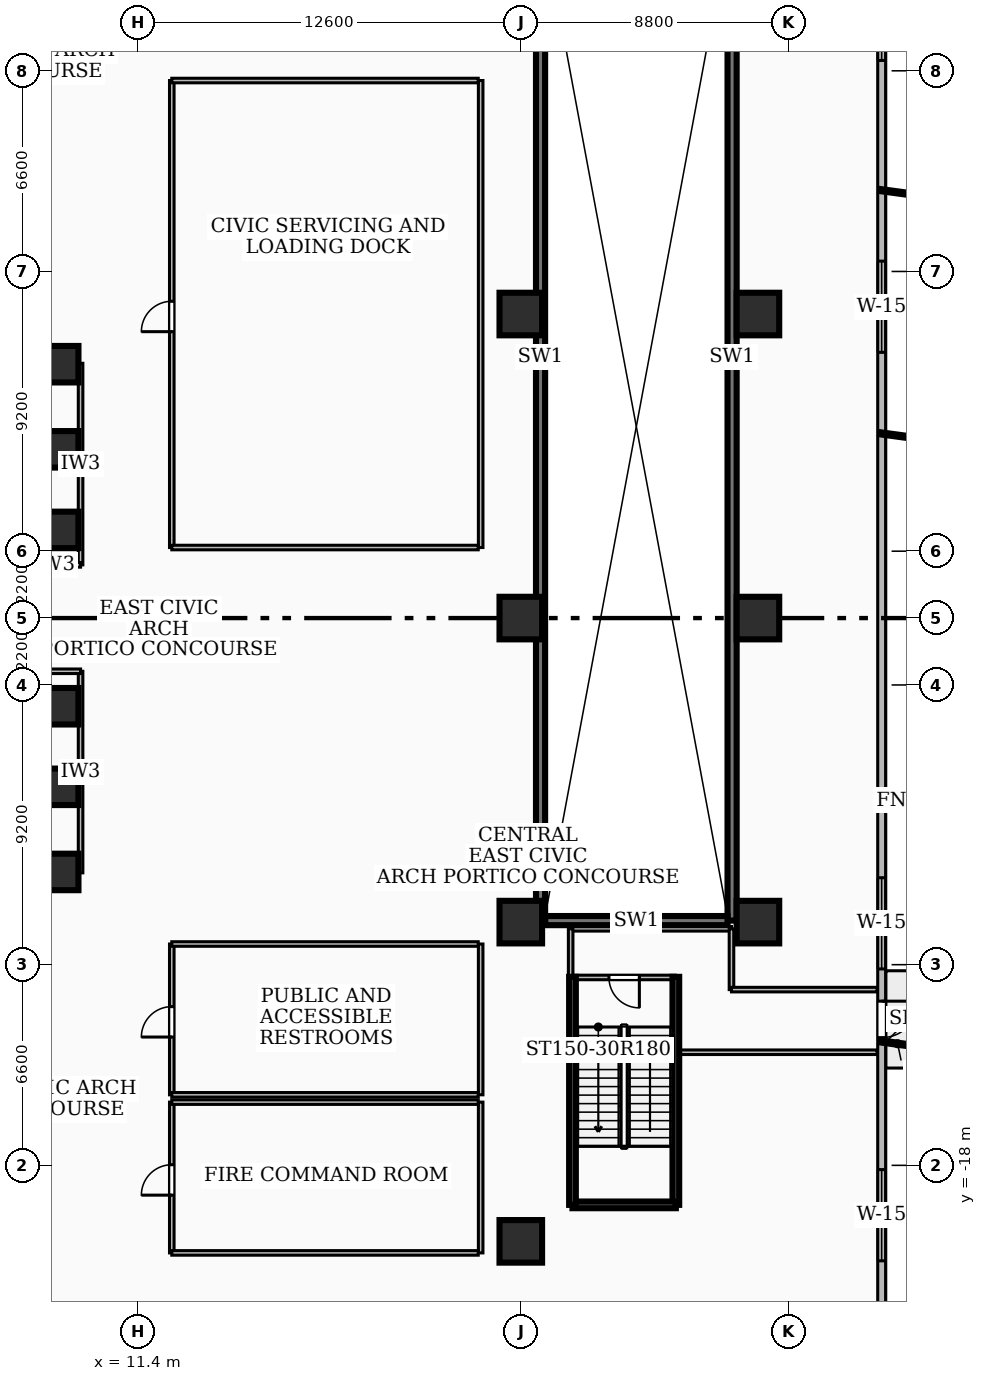
"""IFC4 building model, lengths in metres.
Left out: names, types, materials, properties, quantities, classifications, styles, units other than length and angle.
Written with IfcOpenShell. Run it as: python <this file> out.ifc"""

import sys

from ifc_helpers import new_model, si_unit, direction, frame, frame_2d, origin, origin_2d, place, context, subcontext, project, spatial, rectangle, extrude, element, fill, save


model = new_model("IFC4")
c1 = context("Model", 3, precision=1e-05, world=origin(), true_north=direction((0.0, 1.0)))
c2 = subcontext(c1, "Body", "Model", "MODEL_VIEW")
j1 = project(units=[si_unit("LENGTHUNIT", "METRE"), si_unit("PLANEANGLEUNIT", "RADIAN")], contexts=[c1])
p1 = place(None, origin())
s1 = spatial("IfcSite", under=j1, at=p1, CompositionType="ELEMENT")
p2 = place(p1, origin())
s2 = spatial("IfcBuilding", under=s1, at=p2, CompositionType="ELEMENT")
p3 = place(p2, origin())
s3 = spatial("IfcBuildingStorey", under=s2, at=p3, CompositionType="ELEMENT", Elevation=0.0)
p4 = place(p3, frame((-8.78, 8.585, 0.0), z_axis=(0.0, 0.0, 1.0), x_axis=(1.0, 0.0, 0.0)))
e1 = element("IfcWall", 1, at=p4, inside=s3, PredefinedType="SHEAR", context=c2, shape_type="SweptSolid", body=[
    extrude(rectangle(XDim=17.56, YDim=0.55, at=frame_2d((8.78, 0.0))), origin(), (0.0, 0.0, 1.0), 5.08),
])
p5 = place(p4, frame((7.29, 0.0, 0.0)))
e2 = element("IfcOpeningElement", 2, at=p5, cuts=e1, PredefinedType="OPENING", context=c2, shape_type="SweptSolid", body=[
    extrude(rectangle(XDim=1.1, YDim=2.15, at=frame_2d((0.55, 1.075))), frame((0.0, 0.285, 0.0), z_axis=(0.0, -1.0, 0.0), x_axis=(1.0, 0.0, 0.0)), (0.0, 0.0, 1.0), 0.57),
])
p6 = place(p3, frame((8.78, -8.585, 0.0), z_axis=(0.0, 0.0, 1.0), x_axis=(-1.0, 0.0, 0.0)))
e3 = element("IfcWall", 3, at=p6, inside=s3, PredefinedType="SHEAR", context=c2, shape_type="SweptSolid", body=[
    extrude(rectangle(XDim=17.56, YDim=0.55, at=frame_2d((8.78, 0.0))), origin(), (0.0, 0.0, 1.0), 5.08),
])
p7 = place(p6, frame((7.29, 0.0, 0.0)))
e4 = element("IfcOpeningElement", 4, at=p7, cuts=e3, PredefinedType="OPENING", context=c2, shape_type="SweptSolid", body=[
    extrude(rectangle(XDim=1.1, YDim=2.15, at=frame_2d((0.55, 1.075))), frame((0.0, 0.285, 0.0), z_axis=(0.0, -1.0, 0.0), x_axis=(1.0, 0.0, 0.0)), (0.0, 0.0, 1.0), 0.57),
])
for number, where, z_axis, x_axis in (
    (5, (25.7, -19.3, 0.0), (0.0, 0.0, 1.0), (0.0, 1.0, 0.0)),
    (6, (29.1, -19.3, 0.0), (0.0, 0.0, 1.0), (0.0, 1.0, 0.0)),
):
    element("IfcWall", number, at=place(p3, frame(where, z_axis=z_axis, x_axis=x_axis)), inside=s3, PredefinedType="SOLIDWALL", context=c2, shape_type="SweptSolid", body=[
        extrude(rectangle(XDim=7.5, YDim=0.22, at=frame_2d((3.75, 0.0))), origin(), (0.0, 0.0, 1.0), 5.08),
    ])
p8 = place(p3, frame((25.7, -19.3, 0.0), z_axis=(0.0, 0.0, 1.0), x_axis=(1.0, 0.0, 0.0)))
e7 = element("IfcWall", 7, at=p8, inside=s3, PredefinedType="SOLIDWALL", context=c2, shape_type="SweptSolid", body=[
    extrude(rectangle(XDim=3.4, YDim=0.22, at=frame_2d((1.7, 0.0))), origin(), (0.0, 0.0, 1.0), 5.08),
])
for number, where, z_axis, x_axis in (
    (8, (24.65, -9.95, 0.0), (0.0, 0.0, 1.0), (0.0, 1.0, 0.0)),
    (9, (30.95, 27.1, 0.0), (0.0, 0.0, 1.0), (0.0, -1.0, 0.0)),
):
    element("IfcWall", number, at=place(p3, frame(where, z_axis=z_axis, x_axis=x_axis)), inside=s3, PredefinedType="SOLIDWALL", context=c2, shape_type="SweptSolid", body=[
        extrude(rectangle(XDim=37.05, YDim=0.3, at=frame_2d((18.525, 0.0))), origin(), (0.0, 0.0, 1.0), 5.08),
    ])
p9 = place(p3, frame((30.8, -9.95, 0.0), z_axis=(0.0, 0.0, 1.0), x_axis=(-1.0, 0.0, 0.0)))
e10 = element("IfcWall", 10, at=p9, inside=s3, PredefinedType="SOLIDWALL", context=c2, shape_type="SweptSolid", body=[
    extrude(rectangle(XDim=6.0, YDim=0.3, at=frame_2d((3.0, 0.0))), origin(), (0.0, 0.0, 1.0), 5.08),
])
for number, where, z_axis, x_axis in (
    (11, (8.85, -5.55, 0.0), (0.0, 0.0, 1.0), (1.0, 0.0, 0.0)),
    (12, (8.85, -2.9, 0.0), (0.0, 0.0, 1.0), (1.0, 0.0, 0.0)),
    (13, (8.85, 2.9, 0.0), (0.0, 0.0, 1.0), (1.0, 0.0, 0.0)),
    (14, (8.85, 5.55, 0.0), (0.0, 0.0, 1.0), (1.0, 0.0, 0.0)),
    (15, (8.85, -8.35, 0.0), (0.0, 0.0, 1.0), (1.0, 0.0, 0.0)),
    (16, (8.85, 8.35, 0.0), (0.0, 0.0, 1.0), (1.0, 0.0, 0.0)),
):
    element("IfcColumn", number, at=place(p3, frame(where, z_axis=z_axis, x_axis=x_axis)), inside=s3, PredefinedType="COLUMN", context=c2, shape_type="SweptSolid", body=[
        extrude(rectangle(XDim=1.2, YDim=1.2, at=origin_2d()), origin(), (0.0, 0.0, 1.0), 5.4),
    ])
for number, where, z_axis, x_axis in (
    (17, (31.8, -10.0, 0.0), (0.0, 0.0, 1.0), (1.0, 0.0, 0.0)),
    (18, (31.8, 0.0, 0.0), (0.0, 0.0, 1.0), (1.0, 0.0, 0.0)),
    (19, (31.8, 10.0, 0.0), (0.0, 0.0, 1.0), (1.0, 0.0, 0.0)),
    (20, (24.0, -10.0, 0.0), (0.0, 0.0, 1.0), (1.0, 0.0, 0.0)),
    (21, (24.0, 0.0, 0.0), (0.0, 0.0, 1.0), (1.0, 0.0, 0.0)),
    (22, (24.0, 10.0, 0.0), (0.0, 0.0, 1.0), (1.0, 0.0, 0.0)),
    (23, (24.0, -20.5, 0.0), (0.0, 0.0, 1.0), (1.0, 0.0, 0.0)),
):
    element("IfcColumn", number, at=place(p3, frame(where, z_axis=z_axis, x_axis=x_axis)), inside=s3, PredefinedType="COLUMN", context=c2, shape_type="SweptSolid", body=[
        extrude(rectangle(XDim=1.4, YDim=1.4, at=origin_2d()), origin(), (0.0, 0.0, 1.0), 5.4),
    ])
p10 = place(p3, frame((35.87, 27.34, 0.0), z_axis=(0.0, 0.0, 1.0), x_axis=(0.0, -1.0, 0.0)))
e24 = element("IfcWall", 24, at=p10, inside=s3, PredefinedType="SOLIDWALL", context=c2, shape_type="SweptSolid", body=[
    extrude(rectangle(XDim=54.68, YDim=0.26, at=frame_2d((27.34, 0.0))), origin(), (0.0, 0.0, 1.0), 5.08),
])
p11 = place(p10, frame((39.94, 0.0, 0.0)))
e25 = element("IfcOpeningElement", 25, at=p11, cuts=e24, PredefinedType="OPENING", context=c2, shape_type="SweptSolid", body=[
    extrude(rectangle(XDim=1.2, YDim=2.15, at=frame_2d((0.6, 1.075))), frame((0.0, 0.14, 0.0), z_axis=(0.0, -1.0, 0.0), x_axis=(1.0, 0.0, 0.0)), (0.0, 0.0, 1.0), 0.28),
])
p12 = place(p10, frame((6.0, 0.0, 0.9)))
e26 = element("IfcOpeningElement", 26, at=p12, cuts=e24, PredefinedType="OPENING", context=c2, shape_type="SweptSolid", body=[
    extrude(rectangle(XDim=3.0, YDim=2.4, at=frame_2d((1.5, 1.2))), frame((0.0, 0.14, 0.0), z_axis=(0.0, -1.0, 0.0), x_axis=(1.0, 0.0, 0.0)), (0.0, 0.0, 1.0), 0.28),
])
p13 = place(p10, frame((15.6, 0.0, 0.9)))
e27 = element("IfcOpeningElement", 27, at=p13, cuts=e24, PredefinedType="OPENING", context=c2, shape_type="SweptSolid", body=[
    extrude(rectangle(XDim=3.0, YDim=2.4, at=frame_2d((1.5, 1.2))), frame((0.0, 0.14, 0.0), z_axis=(0.0, -1.0, 0.0), x_axis=(1.0, 0.0, 0.0)), (0.0, 0.0, 1.0), 0.28),
])
p14 = place(p10, frame((35.88, 0.0, 0.9)))
e28 = element("IfcOpeningElement", 28, at=p14, cuts=e24, PredefinedType="OPENING", context=c2, shape_type="SweptSolid", body=[
    extrude(rectangle(XDim=3.0, YDim=2.4, at=frame_2d((1.5, 1.2))), frame((0.0, 0.14, 0.0), z_axis=(0.0, -1.0, 0.0), x_axis=(1.0, 0.0, 0.0)), (0.0, 0.0, 1.0), 0.28),
])
p15 = place(p10, frame((45.48, 0.0, 0.9)))
e29 = element("IfcOpeningElement", 29, at=p15, cuts=e24, PredefinedType="OPENING", context=c2, shape_type="SweptSolid", body=[
    extrude(rectangle(XDim=3.0, YDim=2.4, at=frame_2d((1.5, 1.2))), frame((0.0, 0.14, 0.0), z_axis=(0.0, -1.0, 0.0), x_axis=(1.0, 0.0, 0.0)), (0.0, 0.0, 1.0), 0.28),
])
p16 = place(p3, frame((29.08, -11.82, 0.0), z_axis=(0.0, 0.0, 1.0), x_axis=(-1.0, 0.0, 0.0)))
e30 = element("IfcWall", 30, at=p16, inside=s3, PredefinedType="PARTITIONING", context=c2, shape_type="SweptSolid", body=[
    extrude(rectangle(XDim=3.36, YDim=0.15, at=frame_2d((1.68, 0.0))), origin(), (0.0, 0.0, 1.0), 5.08),
])
p17 = place(p16, frame((1.18, 0.0, 0.0)))
e31 = element("IfcOpeningElement", 31, at=p17, cuts=e30, PredefinedType="OPENING", context=c2, shape_type="SweptSolid", body=[
    extrude(rectangle(XDim=1.0, YDim=2.1, at=frame_2d((0.5, 1.05))), frame((0.0, 0.085, 0.0), z_axis=(0.0, -1.0, 0.0), x_axis=(1.0, 0.0, 0.0)), (0.0, 0.0, 1.0), 0.17),
])
p18 = place(p3, frame((9.52, 1.75, 0.0), z_axis=(0.0, 0.0, 1.0), x_axis=(0.0, 1.0, 0.0)))
e32 = element("IfcWall", 32, at=p18, inside=s3, PredefinedType="PARTITIONING", context=c2, shape_type="SweptSolid", body=[
    extrude(rectangle(XDim=6.63, YDim=0.15, at=frame_2d((3.315, 0.0))), origin(), (0.0, 0.0, 1.0), 4.09),
])
p19 = place(p3, frame((7.85, 1.75, 0.0), z_axis=(0.0, 0.0, 1.0), x_axis=(1.0, 0.0, 0.0)))
e33 = element("IfcWall", 33, at=p19, inside=s3, PredefinedType="PARTITIONING", context=c2, shape_type="SweptSolid", body=[
    extrude(rectangle(XDim=1.67, YDim=0.15, at=frame_2d((0.835, 0.0))), origin(), (0.0, 0.0, 1.0), 4.145),
])
p20 = place(p3, frame((9.52, -8.38, 0.0), z_axis=(0.0, 0.0, 1.0), x_axis=(0.0, 1.0, 0.0)))
e34 = element("IfcWall", 34, at=p20, inside=s3, PredefinedType="PARTITIONING", context=c2, shape_type="SweptSolid", body=[
    extrude(rectangle(XDim=6.63, YDim=0.15, at=frame_2d((3.315, 0.0))), origin(), (0.0, 0.0, 1.0), 4.09),
])
p21 = place(p3, frame((7.85, -1.75, 0.0), z_axis=(0.0, 0.0, 1.0), x_axis=(1.0, 0.0, 0.0)))
e35 = element("IfcWall", 35, at=p21, inside=s3, PredefinedType="PARTITIONING", context=c2, shape_type="SweptSolid", body=[
    extrude(rectangle(XDim=1.67, YDim=0.15, at=frame_2d((0.835, 0.0))), origin(), (0.0, 0.0, 1.0), 4.145),
])
p22 = place(p3, frame((25.64, -11.78, 0.0), z_axis=(0.0, 0.0, 1.0), x_axis=(0.0, 1.0, 0.0)))
e36 = element("IfcWall", 36, at=p22, inside=s3, PredefinedType="PARTITIONING", context=c2, shape_type="SweptSolid", body=[
    extrude(rectangle(XDim=1.56, YDim=0.15, at=frame_2d((0.78, 0.0))), origin(), (0.0, 0.0, 1.0), 5.08),
])
p23 = place(p3, frame((25.64, -10.22, 0.0), z_axis=(0.0, 0.0, 1.0), x_axis=(1.0, 0.0, 0.0)))
e37 = element("IfcWall", 37, at=p23, inside=s3, PredefinedType="PARTITIONING", context=c2, shape_type="SweptSolid", body=[
    extrude(rectangle(XDim=5.29, YDim=0.15, at=frame_2d((2.645, 0.0))), origin(), (0.0, 0.0, 1.0), 4.09),
])
p24 = place(p3, frame((30.93, -12.22, 0.0), z_axis=(0.0, 0.0, 1.0), x_axis=(0.0, 1.0, 0.0)))
e38 = element("IfcWall", 38, at=p24, inside=s3, PredefinedType="PARTITIONING", context=c2, shape_type="SweptSolid", body=[
    extrude(rectangle(XDim=2.0, YDim=0.15, at=frame_2d((1.0, 0.0))), origin(), (0.0, 0.0, 1.0), 5.08),
])
p25 = place(p3, frame((30.93, -12.22, 0.0), z_axis=(0.0, 0.0, 1.0), x_axis=(1.0, 0.0, 0.0)))
e39 = element("IfcWall", 39, at=p25, inside=s3, PredefinedType="PARTITIONING", context=c2, shape_type="SweptSolid", body=[
    extrude(rectangle(XDim=4.79, YDim=0.15, at=frame_2d((2.395, 0.0))), origin(), (0.0, 0.0, 1.0), 4.46),
])
p26 = place(p3, frame((29.2, -14.28, 0.0), z_axis=(0.0, 0.0, 1.0), x_axis=(1.0, 0.0, 0.0)))
e40 = element("IfcWall", 40, at=p26, inside=s3, PredefinedType="PARTITIONING", context=c2, shape_type="SweptSolid", body=[
    extrude(rectangle(XDim=6.52, YDim=0.15, at=frame_2d((3.26, 0.0))), origin(), (0.0, 0.0, 1.0), 4.46),
])
p27 = place(p3, frame((12.52, -20.88, 0.0), z_axis=(0.0, 0.0, 1.0), x_axis=(0.0, 1.0, 0.0)))
e41 = element("IfcWall", 41, at=p27, inside=s3, PredefinedType="PARTITIONING", context=c2, shape_type="SweptSolid", body=[
    extrude(rectangle(XDim=4.96, YDim=0.15, at=frame_2d((2.48, 0.0))), origin(), (0.0, 0.0, 1.0), 5.08),
])
p28 = place(p27, frame((1.9, 0.0, 0.0)))
e42 = element("IfcOpeningElement", 42, at=p28, cuts=e41, PredefinedType="OPENING", context=c2, shape_type="SweptSolid", body=[
    extrude(rectangle(XDim=1.0, YDim=2.1, at=frame_2d((0.5, 1.05))), frame((0.0, 0.085, 0.0), z_axis=(0.0, -1.0, 0.0), x_axis=(1.0, 0.0, 0.0)), (0.0, 0.0, 1.0), 0.17),
])
for number, where, z_axis, x_axis in (
    (43, (12.52, -20.88, 0.0), (0.0, 0.0, 1.0), (1.0, 0.0, 0.0)),
    (44, (12.52, -15.92, 0.0), (0.0, 0.0, 1.0), (1.0, 0.0, 0.0)),
):
    element("IfcWall", number, at=place(p3, frame(where, z_axis=z_axis, x_axis=x_axis)), inside=s3, PredefinedType="PARTITIONING", context=c2, shape_type="SweptSolid", body=[
        extrude(rectangle(XDim=10.08, YDim=0.15, at=frame_2d((5.04, 0.0))), origin(), (0.0, 0.0, 1.0), 5.08),
    ])
p29 = place(p3, frame((22.68, -20.88, 0.0), z_axis=(0.0, 0.0, 1.0), x_axis=(0.0, 1.0, 0.0)))
e45 = element("IfcWall", 45, at=p29, inside=s3, PredefinedType="PARTITIONING", context=c2, shape_type="SweptSolid", body=[
    extrude(rectangle(XDim=4.96, YDim=0.15, at=frame_2d((2.48, 0.0))), origin(), (0.0, 0.0, 1.0), 5.08),
])
p30 = place(p3, frame((12.52, -15.68, 0.0), z_axis=(0.0, 0.0, 1.0), x_axis=(0.0, 1.0, 0.0)))
e46 = element("IfcWall", 46, at=p30, inside=s3, PredefinedType="PARTITIONING", context=c2, shape_type="SweptSolid", body=[
    extrude(rectangle(XDim=4.96, YDim=0.15, at=frame_2d((2.48, 0.0))), origin(), (0.0, 0.0, 1.0), 5.08),
])
p31 = place(p30, frame((1.9, 0.0, 0.0)))
e47 = element("IfcOpeningElement", 47, at=p31, cuts=e46, PredefinedType="OPENING", context=c2, shape_type="SweptSolid", body=[
    extrude(rectangle(XDim=1.0, YDim=2.1, at=frame_2d((0.5, 1.05))), frame((0.0, 0.085, 0.0), z_axis=(0.0, -1.0, 0.0), x_axis=(1.0, 0.0, 0.0)), (0.0, 0.0, 1.0), 0.17),
])
for number, where, z_axis, x_axis in (
    (48, (12.52, -15.68, 0.0), (0.0, 0.0, 1.0), (1.0, 0.0, 0.0)),
    (49, (12.52, -10.72, 0.0), (0.0, 0.0, 1.0), (1.0, 0.0, 0.0)),
):
    element("IfcWall", number, at=place(p3, frame(where, z_axis=z_axis, x_axis=x_axis)), inside=s3, PredefinedType="PARTITIONING", context=c2, shape_type="SweptSolid", body=[
        extrude(rectangle(XDim=10.08, YDim=0.15, at=frame_2d((5.04, 0.0))), origin(), (0.0, 0.0, 1.0), 5.08),
    ])
p32 = place(p3, frame((22.68, -15.68, 0.0), z_axis=(0.0, 0.0, 1.0), x_axis=(0.0, 1.0, 0.0)))
e50 = element("IfcWall", 50, at=p32, inside=s3, PredefinedType="PARTITIONING", context=c2, shape_type="SweptSolid", body=[
    extrude(rectangle(XDim=4.96, YDim=0.15, at=frame_2d((2.48, 0.0))), origin(), (0.0, 0.0, 1.0), 5.08),
])
p33 = place(p3, frame((12.52, 2.32, 0.0), z_axis=(0.0, 0.0, 1.0), x_axis=(0.0, 1.0, 0.0)))
e51 = element("IfcWall", 51, at=p33, inside=s3, PredefinedType="PARTITIONING", context=c2, shape_type="SweptSolid", body=[
    extrude(rectangle(XDim=15.36, YDim=0.15, at=frame_2d((7.68, 0.0))), origin(), (0.0, 0.0, 1.0), 4.09),
])
p34 = place(p33, frame((7.1, 0.0, 0.0)))
e52 = element("IfcOpeningElement", 52, at=p34, cuts=e51, PredefinedType="OPENING", context=c2, shape_type="SweptSolid", body=[
    extrude(rectangle(XDim=1.0, YDim=2.1, at=frame_2d((0.5, 1.05))), frame((0.0, 0.085, 0.0), z_axis=(0.0, -1.0, 0.0), x_axis=(1.0, 0.0, 0.0)), (0.0, 0.0, 1.0), 0.17),
])
for number, where, z_axis, x_axis in (
    (53, (12.52, 2.32, 0.0), (0.0, 0.0, 1.0), (1.0, 0.0, 0.0)),
    (54, (12.52, 17.68, 0.0), (0.0, 0.0, 1.0), (1.0, 0.0, 0.0)),
):
    element("IfcWall", number, at=place(p3, frame(where, z_axis=z_axis, x_axis=x_axis)), inside=s3, PredefinedType="PARTITIONING", context=c2, shape_type="SweptSolid", body=[
        extrude(rectangle(XDim=10.08, YDim=0.15, at=frame_2d((5.04, 0.0))), origin(), (0.0, 0.0, 1.0), 5.08),
    ])
p35 = place(p3, frame((22.68, 2.32, 0.0), z_axis=(0.0, 0.0, 1.0), x_axis=(0.0, 1.0, 0.0)))
e55 = element("IfcWall", 55, at=p35, inside=s3, PredefinedType="PARTITIONING", context=c2, shape_type="SweptSolid", body=[
    extrude(rectangle(XDim=15.36, YDim=0.15, at=frame_2d((7.68, 0.0))), origin(), (0.0, 0.0, 1.0), 4.09),
])
p36 = place(p11, origin())
e56 = element("IfcDoor", 56, at=p36, inside=s3, OperationType="SINGLE_SWING_LEFT", PredefinedType="DOOR", context=c2, shape_type="SweptSolid", body=[
    extrude(rectangle(XDim=1.2, YDim=2.15, at=frame_2d((0.6, 1.075))), frame((0.0, 0.025, 0.0), z_axis=(0.0, -1.0, 0.0), x_axis=(1.0, 0.0, 0.0)), (0.0, 0.0, 1.0), 0.05),
])
fill(e25, e56)
p37 = place(p12, origin())
e57 = element("IfcWindow", 57, at=p37, inside=s3, PartitioningType="SINGLE_PANEL", PredefinedType="WINDOW", context=c2, shape_type="SweptSolid", body=[
    extrude(rectangle(XDim=3.0, YDim=2.4, at=frame_2d((1.5, 1.2))), frame((0.0, 0.03, 0.0), z_axis=(0.0, -1.0, 0.0), x_axis=(1.0, 0.0, 0.0)), (0.0, 0.0, 1.0), 0.06),
])
fill(e26, e57)
p38 = place(p13, origin())
e58 = element("IfcWindow", 58, at=p38, inside=s3, PartitioningType="SINGLE_PANEL", PredefinedType="WINDOW", context=c2, shape_type="SweptSolid", body=[
    extrude(rectangle(XDim=3.0, YDim=2.4, at=frame_2d((1.5, 1.2))), frame((0.0, 0.03, 0.0), z_axis=(0.0, -1.0, 0.0), x_axis=(1.0, 0.0, 0.0)), (0.0, 0.0, 1.0), 0.06),
])
fill(e27, e58)
p39 = place(p14, origin())
e59 = element("IfcWindow", 59, at=p39, inside=s3, PartitioningType="SINGLE_PANEL", PredefinedType="WINDOW", context=c2, shape_type="SweptSolid", body=[
    extrude(rectangle(XDim=3.0, YDim=2.4, at=frame_2d((1.5, 1.2))), frame((0.0, 0.03, 0.0), z_axis=(0.0, -1.0, 0.0), x_axis=(1.0, 0.0, 0.0)), (0.0, 0.0, 1.0), 0.06),
])
fill(e28, e59)
p40 = place(p15, origin())
e60 = element("IfcWindow", 60, at=p40, inside=s3, PartitioningType="SINGLE_PANEL", PredefinedType="WINDOW", context=c2, shape_type="SweptSolid", body=[
    extrude(rectangle(XDim=3.0, YDim=2.4, at=frame_2d((1.5, 1.2))), frame((0.0, 0.03, 0.0), z_axis=(0.0, -1.0, 0.0), x_axis=(1.0, 0.0, 0.0)), (0.0, 0.0, 1.0), 0.06),
])
fill(e29, e60)
p41 = place(p17, origin())
e61 = element("IfcDoor", 61, at=p41, inside=s3, OperationType="SINGLE_SWING_LEFT", PredefinedType="DOOR", context=c2, shape_type="SweptSolid", body=[
    extrude(rectangle(XDim=1.0, YDim=2.1, at=frame_2d((0.5, 1.05))), frame((0.0, 0.025, 0.0), z_axis=(0.0, -1.0, 0.0), x_axis=(1.0, 0.0, 0.0)), (0.0, 0.0, 1.0), 0.05),
])
fill(e31, e61)
p42 = place(p28, origin())
e62 = element("IfcDoor", 62, at=p42, inside=s3, OperationType="SINGLE_SWING_LEFT", PredefinedType="DOOR", context=c2, shape_type="SweptSolid", body=[
    extrude(rectangle(XDim=1.0, YDim=2.1, at=frame_2d((0.5, 1.05))), frame((0.0, 0.025, 0.0), z_axis=(0.0, -1.0, 0.0), x_axis=(1.0, 0.0, 0.0)), (0.0, 0.0, 1.0), 0.05),
])
fill(e42, e62)
p43 = place(p31, origin())
e63 = element("IfcDoor", 63, at=p43, inside=s3, OperationType="SINGLE_SWING_LEFT", PredefinedType="DOOR", context=c2, shape_type="SweptSolid", body=[
    extrude(rectangle(XDim=1.0, YDim=2.1, at=frame_2d((0.5, 1.05))), frame((0.0, 0.025, 0.0), z_axis=(0.0, -1.0, 0.0), x_axis=(1.0, 0.0, 0.0)), (0.0, 0.0, 1.0), 0.05),
])
fill(e47, e63)
p44 = place(p34, origin())
e64 = element("IfcDoor", 64, at=p44, inside=s3, OperationType="SINGLE_SWING_LEFT", PredefinedType="DOOR", context=c2, shape_type="SweptSolid", body=[
    extrude(rectangle(XDim=1.0, YDim=2.1, at=frame_2d((0.5, 1.05))), frame((0.0, 0.025, 0.0), z_axis=(0.0, -1.0, 0.0), x_axis=(1.0, 0.0, 0.0)), (0.0, 0.0, 1.0), 0.05),
])
fill(e52, e64)
save(model, sys.argv[1])
